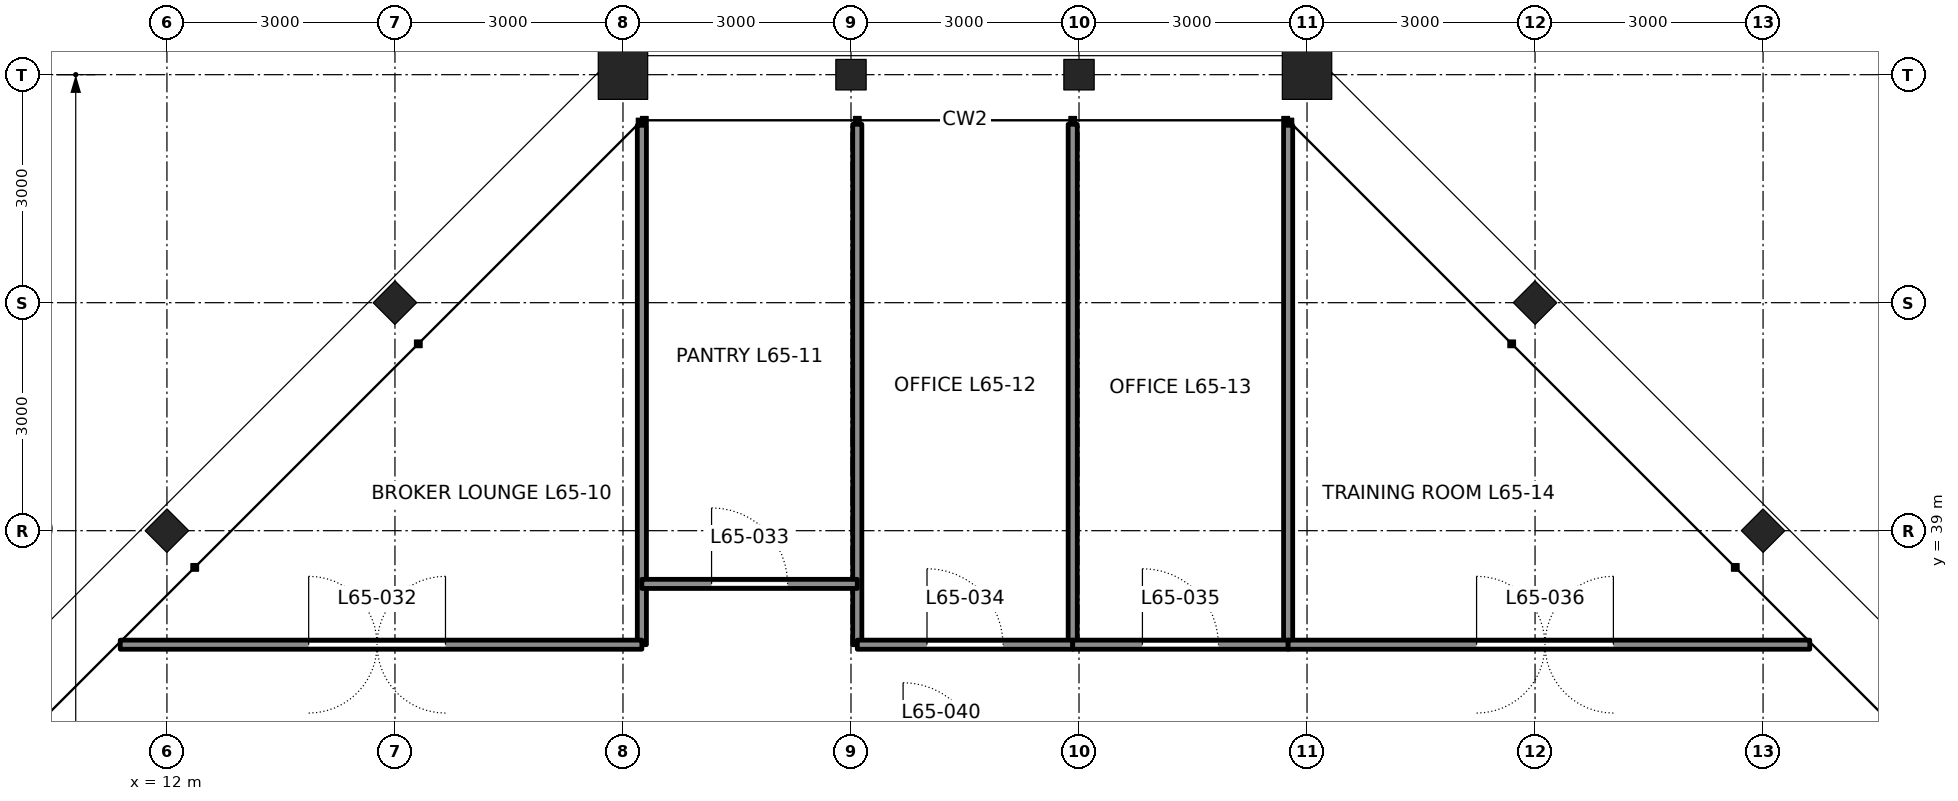
"""IFC4 building model, lengths in metres.
Left out: names, types, materials, properties, quantities, classifications, styles, units other than length and angle.
Written with IfcOpenShell. Run it as: python <this file> out.ifc"""

import sys

from ifc_helpers import new_model, si_unit, direction, frame, frame_2d, origin, origin_2d, place, context, subcontext, project, spatial, rectangle, hollow_rectangle, i_section, extrude, element, fill, save


model = new_model("IFC4")
c1 = context("Model", 3, precision=1e-05, world=origin(), true_north=direction((0.0, 1.0)))
c2 = subcontext(c1, "Body", "Model", "MODEL_VIEW")
j1 = project(units=[si_unit("LENGTHUNIT", "METRE"), si_unit("PLANEANGLEUNIT", "RADIAN")], contexts=[c1])
p1 = place(None, origin())
s1 = spatial("IfcSite", under=j1, at=p1, CompositionType="ELEMENT")
p2 = place(p1, origin())
s2 = spatial("IfcBuilding", under=s1, at=p2, CompositionType="ELEMENT")
p3 = place(p2, frame((0.0, 0.0, 291.6)))
s3 = spatial("IfcBuildingStorey", under=s2, at=p3, CompositionType="ELEMENT", Elevation=291.6)
for number, where, z_axis, x_axis in (
    (1, (33.0, 39.0, 0.0), (0.0, 0.0, 1.0), (0.707, 0.707, 0.0)),
    (2, (30.0, 42.0, 0.0), (0.0, 0.0, 1.0), (0.707, 0.707, 0.0)),
):
    element("IfcColumn", number, at=place(p3, frame(where, z_axis=z_axis, x_axis=x_axis)), inside=s3, PredefinedType="COLUMN", context=c2, shape_type="SweptSolid", body=[
        extrude(i_section(OverallWidth=0.404, OverallDepth=0.406, WebThickness=0.027, FlangeThickness=0.044, at=origin_2d()), origin(), (0.0, 0.0, 1.0), 4.2),
    ])
p4 = place(p3, frame((27.0, 45.0, 0.0), z_axis=(0.0, 0.0, 1.0), x_axis=(0.0, 1.0, 0.0)))
e3 = element("IfcColumn", 3, at=p4, inside=s3, PredefinedType="COLUMN", context=c2, shape_type="SweptSolid", body=[
    extrude(hollow_rectangle(XDim=0.65, YDim=0.65, WallThickness=0.065, at=origin_2d()), origin(), (0.0, 0.0, 1.0), 4.2),
])
for number, where, z_axis, x_axis in (
    (4, (24.0, 45.0, 0.0), (0.0, 0.0, 1.0), (0.0, 1.0, 0.0)),
    (5, (21.0, 45.0, 0.0), (0.0, 0.0, 1.0), (0.0, 1.0, 0.0)),
):
    element("IfcColumn", number, at=place(p3, frame(where, z_axis=z_axis, x_axis=x_axis)), inside=s3, PredefinedType="COLUMN", context=c2, shape_type="SweptSolid", body=[
        extrude(i_section(OverallWidth=0.401, OverallDepth=0.399, WebThickness=0.025, FlangeThickness=0.04, at=origin_2d()), origin(), (0.0, 0.0, 1.0), 4.2),
    ])
p5 = place(p3, frame((18.0, 45.0, 0.0), z_axis=(0.0, 0.0, 1.0), x_axis=(0.0, 1.0, 0.0)))
e6 = element("IfcColumn", 6, at=p5, inside=s3, PredefinedType="COLUMN", context=c2, shape_type="SweptSolid", body=[
    extrude(hollow_rectangle(XDim=0.65, YDim=0.65, WallThickness=0.065, at=origin_2d()), origin(), (0.0, 0.0, 1.0), 4.2),
])
for number, where, z_axis, x_axis in (
    (7, (15.0, 42.0, 0.0), (0.0, 0.0, 1.0), (-0.707, 0.707, 0.0)),
    (8, (12.0, 39.0, 0.0), (0.0, 0.0, 1.0), (-0.707, 0.707, 0.0)),
):
    element("IfcColumn", number, at=place(p3, frame(where, z_axis=z_axis, x_axis=x_axis)), inside=s3, PredefinedType="COLUMN", context=c2, shape_type="SweptSolid", body=[
        extrude(i_section(OverallWidth=0.404, OverallDepth=0.406, WebThickness=0.027, FlangeThickness=0.044, at=origin_2d()), origin(), (0.0, 0.0, 1.0), 4.2),
    ])
p6 = place(p3, frame((18.249, 44.334, 0.0), z_axis=(0.0, 0.0, 1.0), x_axis=(0.0, -1.0, 0.0)))
e9 = element("IfcWall", 9, at=p6, inside=s3, PredefinedType="PARTITIONING", context=c2, shape_type="SweptSolid", body=[
    extrude(rectangle(XDim=6.834, YDim=0.12, at=frame_2d((3.417, 0.0))), origin(), (0.0, 0.0, 1.0), 4.04),
])
for number, where, z_axis, x_axis in (
    (10, (21.083, 44.347, 0.0), (0.0, 0.0, 1.0), (0.0, -1.0, 0.0)),
    (11, (23.917, 44.347, 0.0), (0.0, 0.0, 1.0), (0.0, -1.0, 0.0)),
):
    element("IfcWall", number, at=place(p3, frame(where, z_axis=z_axis, x_axis=x_axis)), inside=s3, PredefinedType="PARTITIONING", context=c2, shape_type="SweptSolid", body=[
        extrude(rectangle(XDim=6.847, YDim=0.12, at=frame_2d((3.424, 0.0))), origin(), (0.0, 0.0, 1.0), 3.357),
    ])
p7 = place(p3, frame((26.751, 44.334, 0.0), z_axis=(0.0, 0.0, 1.0), x_axis=(0.0, -1.0, 0.0)))
e12 = element("IfcWall", 12, at=p7, inside=s3, PredefinedType="PARTITIONING", context=c2, shape_type="SweptSolid", body=[
    extrude(rectangle(XDim=6.834, YDim=0.12, at=frame_2d((3.417, 0.0))), origin(), (0.0, 0.0, 1.0), 4.04),
])
p8 = place(p3, frame((11.385, 37.5, 0.0), z_axis=(0.0, 0.0, 1.0), x_axis=(1.0, 0.0, 0.0)))
e13 = element("IfcWall", 13, at=p8, inside=s3, PredefinedType="PARTITIONING", context=c2, shape_type="SweptSolid", body=[
    extrude(rectangle(XDim=6.863, YDim=0.12, at=frame_2d((3.432, 0.0))), origin(), (0.0, 0.0, 1.0), 4.04),
])
p9 = place(p8, frame((2.479, 0.0, 0.0)))
e14 = element("IfcOpeningElement", 14, at=p9, cuts=e13, PredefinedType="OPENING", context=c2, shape_type="SweptSolid", body=[
    extrude(rectangle(XDim=1.8, YDim=2.4, at=frame_2d((0.9, 1.2))), frame((0.0, 0.07, 0.0), z_axis=(0.0, -1.0, 0.0), x_axis=(1.0, 0.0, 0.0)), (0.0, 0.0, 1.0), 0.14),
])
p10 = place(p3, frame((18.249, 38.3, 0.0), z_axis=(0.0, 0.0, 1.0), x_axis=(1.0, 0.0, 0.0)))
e15 = element("IfcWall", 15, at=p10, inside=s3, PredefinedType="PARTITIONING", context=c2, shape_type="SweptSolid", body=[
    extrude(rectangle(XDim=2.834, YDim=0.12, at=frame_2d((1.417, 0.0))), origin(), (0.0, 0.0, 1.0), 4.04),
])
p11 = place(p10, frame((0.917, 0.0, 0.0)))
e16 = element("IfcOpeningElement", 16, at=p11, cuts=e15, PredefinedType="OPENING", context=c2, shape_type="SweptSolid", body=[
    extrude(rectangle(XDim=1.0, YDim=2.4, at=frame_2d((0.5, 1.2))), frame((0.0, 0.07, 0.0), z_axis=(0.0, -1.0, 0.0), x_axis=(1.0, 0.0, 0.0)), (0.0, 0.0, 1.0), 0.14),
])
p12 = place(p3, frame((21.083, 37.5, 0.0), z_axis=(0.0, 0.0, 1.0), x_axis=(1.0, 0.0, 0.0)))
e17 = element("IfcWall", 17, at=p12, inside=s3, PredefinedType="PARTITIONING", context=c2, shape_type="SweptSolid", body=[
    extrude(rectangle(XDim=2.834, YDim=0.12, at=frame_2d((1.417, 0.0))), origin(), (0.0, 0.0, 1.0), 4.04),
])
p13 = place(p12, frame((0.917, 0.0, 0.0)))
e18 = element("IfcOpeningElement", 18, at=p13, cuts=e17, PredefinedType="OPENING", context=c2, shape_type="SweptSolid", body=[
    extrude(rectangle(XDim=1.0, YDim=2.4, at=frame_2d((0.5, 1.2))), frame((0.0, 0.07, 0.0), z_axis=(0.0, -1.0, 0.0), x_axis=(1.0, 0.0, 0.0)), (0.0, 0.0, 1.0), 0.14),
])
p14 = place(p3, frame((23.917, 37.5, 0.0), z_axis=(0.0, 0.0, 1.0), x_axis=(1.0, 0.0, 0.0)))
e19 = element("IfcWall", 19, at=p14, inside=s3, PredefinedType="PARTITIONING", context=c2, shape_type="SweptSolid", body=[
    extrude(rectangle(XDim=2.834, YDim=0.12, at=frame_2d((1.417, 0.0))), origin(), (0.0, 0.0, 1.0), 4.04),
])
p15 = place(p14, frame((0.917, 0.0, 0.0)))
e20 = element("IfcOpeningElement", 20, at=p15, cuts=e19, PredefinedType="OPENING", context=c2, shape_type="SweptSolid", body=[
    extrude(rectangle(XDim=1.0, YDim=2.4, at=frame_2d((0.5, 1.2))), frame((0.0, 0.07, 0.0), z_axis=(0.0, -1.0, 0.0), x_axis=(1.0, 0.0, 0.0)), (0.0, 0.0, 1.0), 0.14),
])
p16 = place(p3, frame((26.751, 37.5, 0.0), z_axis=(0.0, 0.0, 1.0), x_axis=(1.0, 0.0, 0.0)))
e21 = element("IfcWall", 21, at=p16, inside=s3, PredefinedType="PARTITIONING", context=c2, shape_type="SweptSolid", body=[
    extrude(rectangle(XDim=6.863, YDim=0.12, at=frame_2d((3.432, 0.0))), origin(), (0.0, 0.0, 1.0), 4.04),
])
p17 = place(p16, frame((2.479, 0.0, 0.0)))
e22 = element("IfcOpeningElement", 22, at=p17, cuts=e21, PredefinedType="OPENING", context=c2, shape_type="SweptSolid", body=[
    extrude(rectangle(XDim=1.8, YDim=2.4, at=frame_2d((0.9, 1.2))), frame((0.0, 0.07, 0.0), z_axis=(0.0, -1.0, 0.0), x_axis=(1.0, 0.0, 0.0)), (0.0, 0.0, 1.0), 0.14),
])
p18 = place(p9, origin())
e23 = element("IfcDoor", 23, at=p18, inside=s3, OperationType="DOUBLE_DOOR_DOUBLE_SWING", PredefinedType="DOOR", context=c2, shape_type="SweptSolid", body=[
    extrude(rectangle(XDim=1.8, YDim=2.4, at=frame_2d((0.9, 1.2))), frame((0.0, 0.025, 0.0), z_axis=(0.0, -1.0, 0.0), x_axis=(1.0, 0.0, 0.0)), (0.0, 0.0, 1.0), 0.05),
])
fill(e14, e23)
p19 = place(p11, origin())
e24 = element("IfcDoor", 24, at=p19, inside=s3, OperationType="SINGLE_SWING_LEFT", PredefinedType="DOOR", context=c2, shape_type="SweptSolid", body=[
    extrude(rectangle(XDim=1.0, YDim=2.4, at=frame_2d((0.5, 1.2))), frame((0.0, 0.025, 0.0), z_axis=(0.0, -1.0, 0.0), x_axis=(1.0, 0.0, 0.0)), (0.0, 0.0, 1.0), 0.05),
])
fill(e16, e24)
p20 = place(p13, origin())
e25 = element("IfcDoor", 25, at=p20, inside=s3, OperationType="SINGLE_SWING_LEFT", PredefinedType="DOOR", context=c2, shape_type="SweptSolid", body=[
    extrude(rectangle(XDim=1.0, YDim=2.4, at=frame_2d((0.5, 1.2))), frame((0.0, 0.025, 0.0), z_axis=(0.0, -1.0, 0.0), x_axis=(1.0, 0.0, 0.0)), (0.0, 0.0, 1.0), 0.05),
])
fill(e18, e25)
p21 = place(p15, origin())
e26 = element("IfcDoor", 26, at=p21, inside=s3, OperationType="SINGLE_SWING_LEFT", PredefinedType="DOOR", context=c2, shape_type="SweptSolid", body=[
    extrude(rectangle(XDim=1.0, YDim=2.4, at=frame_2d((0.5, 1.2))), frame((0.0, 0.025, 0.0), z_axis=(0.0, -1.0, 0.0), x_axis=(1.0, 0.0, 0.0)), (0.0, 0.0, 1.0), 0.05),
])
fill(e20, e26)
p22 = place(p17, origin())
e27 = element("IfcDoor", 27, at=p22, inside=s3, OperationType="DOUBLE_DOOR_DOUBLE_SWING", PredefinedType="DOOR", context=c2, shape_type="SweptSolid", body=[
    extrude(rectangle(XDim=1.8, YDim=2.4, at=frame_2d((0.9, 1.2))), frame((0.0, 0.025, 0.0), z_axis=(0.0, -1.0, 0.0), x_axis=(1.0, 0.0, 0.0)), (0.0, 0.0, 1.0), 0.05),
])
fill(e22, e27)
save(model, sys.argv[1])
